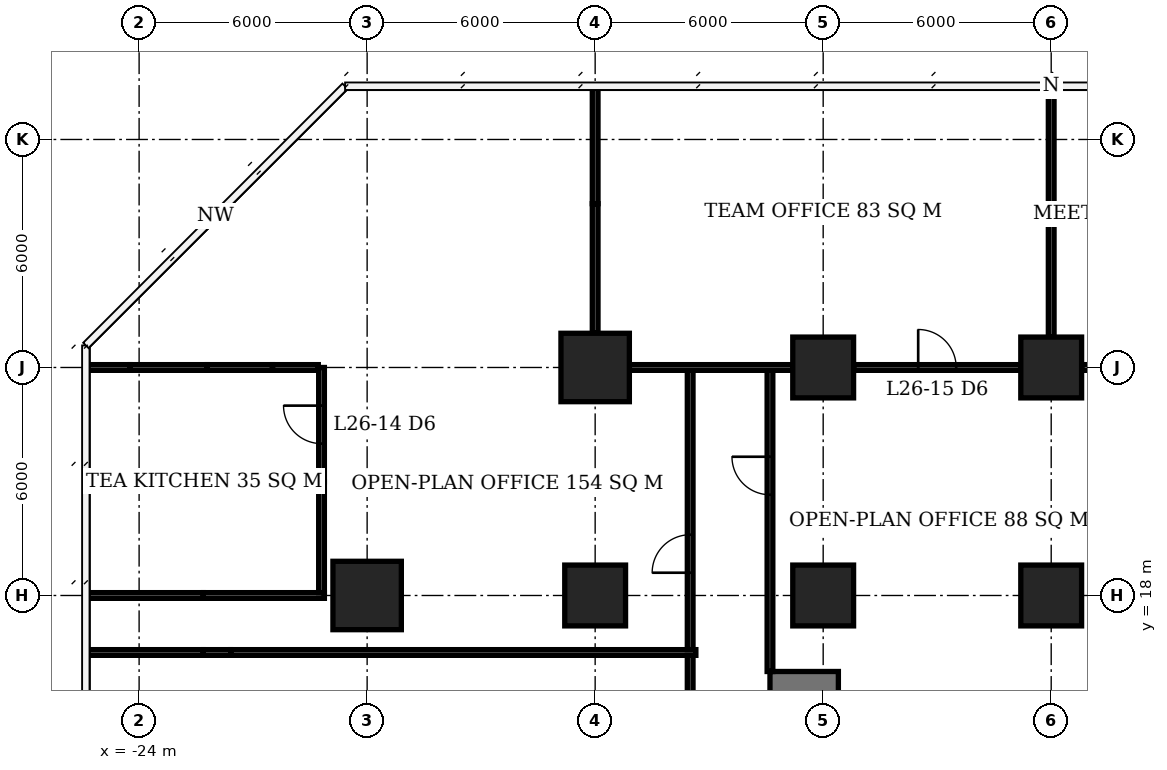
"""IFC4 building model, lengths in metres.
Left out: names, types, materials, properties, quantities, classifications, styles, units other than length and angle.
Written with IfcOpenShell. Run it as: python <this file> out.ifc"""

import sys

from ifc_helpers import new_model, si_unit, direction, frame, frame_2d, origin, origin_2d, place, context, subcontext, project, spatial, rectangle, extrude, element, fill, save


model = new_model("IFC4")
c1 = context("Model", 3, precision=1e-05, world=origin(), true_north=direction((0.0, 1.0)))
c2 = subcontext(c1, "Body", "Model", "MODEL_VIEW")
j1 = project(units=[si_unit("LENGTHUNIT", "METRE"), si_unit("PLANEANGLEUNIT", "RADIAN")], contexts=[c1])
p1 = place(None, origin())
s1 = spatial("IfcSite", under=j1, at=p1, CompositionType="ELEMENT")
p2 = place(p1, origin())
s2 = spatial("IfcBuilding", under=s1, at=p2, CompositionType="ELEMENT")
p3 = place(p2, frame((0.0, 0.0, 109.4)))
s3 = spatial("IfcBuildingStorey", under=s2, at=p3, CompositionType="ELEMENT", Elevation=109.4)
p4 = place(p3, frame((-18.0, 18.0, 0.0), z_axis=(0.0, 0.0, 1.0), x_axis=(1.0, 0.0, 0.0)))
e1 = element("IfcColumn", 1, at=p4, inside=s3, PredefinedType="COLUMN", context=c2, shape_type="SweptSolid", body=[
    extrude(rectangle(XDim=1.8, YDim=1.8, at=origin_2d()), origin(), (0.0, 0.0, 1.0), 3.9),
])
p5 = place(p3, frame((-12.0, 18.0, 0.0), z_axis=(0.0, 0.0, 1.0), x_axis=(1.0, 0.0, 0.0)))
e2 = element("IfcColumn", 2, at=p5, inside=s3, PredefinedType="COLUMN", context=c2, shape_type="SweptSolid", body=[
    extrude(rectangle(XDim=1.6, YDim=1.6, at=origin_2d()), origin(), (0.0, 0.0, 1.0), 3.9),
])
p6 = place(p3, frame((-12.0, 24.0, 0.0), z_axis=(0.0, 0.0, 1.0), x_axis=(1.0, 0.0, 0.0)))
e3 = element("IfcColumn", 3, at=p6, inside=s3, PredefinedType="COLUMN", context=c2, shape_type="SweptSolid", body=[
    extrude(rectangle(XDim=1.8, YDim=1.8, at=origin_2d()), origin(), (0.0, 0.0, 1.0), 3.9),
])
for number, where, z_axis, x_axis in (
    (4, (-6.0, 18.0, 0.0), (0.0, 0.0, 1.0), (1.0, 0.0, 0.0)),
    (5, (-6.0, 24.0, 0.0), (0.0, 0.0, 1.0), (1.0, 0.0, 0.0)),
    (6, (0.0, 18.0, 0.0), (0.0, 0.0, 1.0), (1.0, 0.0, 0.0)),
    (7, (0.0, 24.0, 0.0), (0.0, 0.0, 1.0), (1.0, 0.0, 0.0)),
):
    element("IfcColumn", number, at=place(p3, frame(where, z_axis=z_axis, x_axis=x_axis)), inside=s3, PredefinedType="COLUMN", context=c2, shape_type="SweptSolid", body=[
        extrude(rectangle(XDim=1.6, YDim=1.6, at=origin_2d()), origin(), (0.0, 0.0, 1.0), 3.9),
    ])
p7 = place(p3, frame((-6.5, 13.6, 0.0), z_axis=(0.0, 0.0, 1.0), x_axis=(0.0, 1.0, 0.0)))
e8 = element("IfcWall", 8, at=p7, inside=s3, PredefinedType="SHEAR", context=c2, shape_type="SweptSolid", body=[
    extrude(rectangle(XDim=2.4, YDim=1.8, at=frame_2d((1.2, 0.0))), origin(), (0.0, 0.0, 1.0), 3.9),
])
p8 = place(p3, frame((-25.4, 18.0, 0.0), z_axis=(0.0, 0.0, 1.0), x_axis=(1.0, 0.0, 0.0)))
e9 = element("IfcWall", 9, at=p8, inside=s3, PredefinedType="PARTITIONING", context=c2, shape_type="SweptSolid", body=[
    extrude(rectangle(XDim=3.09, YDim=0.15, at=frame_2d((1.545, 0.0))), origin(), (0.0, 0.0, 1.0), 3.65),
])
p9 = place(p3, frame((-22.31, 18.0, 0.0), z_axis=(0.0, 0.0, 1.0), x_axis=(1.0, 0.0, 0.0)))
e10 = element("IfcWall", 10, at=p9, inside=s3, PredefinedType="PARTITIONING", context=c2, shape_type="SweptSolid", body=[
    extrude(rectangle(XDim=3.185, YDim=0.15, at=frame_2d((1.593, 0.0))), origin(), (0.0, 0.0, 1.0), 2.65),
])
p10 = place(p3, frame((-25.4, 24.0, 0.0), z_axis=(0.0, 0.0, 1.0), x_axis=(1.0, 0.0, 0.0)))
e11 = element("IfcWall", 11, at=p10, inside=s3, PredefinedType="PARTITIONING", context=c2, shape_type="SweptSolid", body=[
    extrude(rectangle(XDim=1.163, YDim=0.15, at=frame_2d((0.582, 0.0))), origin(), (0.0, 0.0, 1.0), 3.65),
])
p11 = place(p3, frame((-24.237, 24.0, 0.0), z_axis=(0.0, 0.0, 1.0), x_axis=(1.0, 0.0, 0.0)))
e12 = element("IfcWall", 12, at=p11, inside=s3, PredefinedType="PARTITIONING", context=c2, shape_type="SweptSolid", body=[
    extrude(rectangle(XDim=2.029, YDim=0.15, at=frame_2d((1.015, 0.0))), origin(), (0.0, 0.0, 1.0), 2.65),
])
p12 = place(p3, frame((-22.208, 24.0, 0.0), z_axis=(0.0, 0.0, 1.0), x_axis=(1.0, 0.0, 0.0)))
e13 = element("IfcWall", 13, at=p12, inside=s3, PredefinedType="PARTITIONING", context=c2, shape_type="SweptSolid", body=[
    extrude(rectangle(XDim=1.718, YDim=0.15, at=frame_2d((0.859, 0.0))), origin(), (0.0, 0.0, 1.0), 3.65),
])
p13 = place(p3, frame((-20.49, 24.0, 0.0), z_axis=(0.0, 0.0, 1.0), x_axis=(1.0, 0.0, 0.0)))
e14 = element("IfcWall", 14, at=p13, inside=s3, PredefinedType="PARTITIONING", context=c2, shape_type="SweptSolid", body=[
    extrude(rectangle(XDim=1.205, YDim=0.15, at=frame_2d((0.603, 0.0))), origin(), (0.0, 0.0, 1.0), 2.65),
])
p14 = place(p3, frame((-11.1, 24.0, 0.0), z_axis=(0.0, 0.0, 1.0), x_axis=(1.0, 0.0, 0.0)))
e15 = element("IfcWall", 15, at=p14, inside=s3, PredefinedType="PARTITIONING", context=c2, shape_type="SweptSolid", body=[
    extrude(rectangle(XDim=4.3, YDim=0.15, at=frame_2d((2.15, 0.0))), origin(), (0.0, 0.0, 1.0), 3.65),
])
p15 = place(p3, frame((-5.2, 24.0, 0.0), z_axis=(0.0, 0.0, 1.0), x_axis=(1.0, 0.0, 0.0)))
e16 = element("IfcWall", 16, at=p15, inside=s3, PredefinedType="PARTITIONING", context=c2, shape_type="SweptSolid", body=[
    extrude(rectangle(XDim=4.4, YDim=0.15, at=frame_2d((2.2, 0.0))), origin(), (0.0, 0.0, 1.0), 3.65),
])
p16 = place(p15, frame((1.7, 0.0, 0.0)))
e17 = element("IfcOpeningElement", 17, at=p16, cuts=e16, PredefinedType="OPENING", context=c2, shape_type="SweptSolid", body=[
    extrude(rectangle(XDim=1.0, YDim=2.1, at=frame_2d((0.5, 1.05))), frame((0.0, 0.085, 0.0), z_axis=(0.0, -1.0, 0.0), x_axis=(1.0, 0.0, 0.0)), (0.0, 0.0, 1.0), 0.17),
])
p17 = place(p3, frame((0.8, 24.0, 0.0), z_axis=(0.0, 0.0, 1.0), x_axis=(1.0, 0.0, 0.0)))
e18 = element("IfcWall", 18, at=p17, inside=s3, PredefinedType="PARTITIONING", context=c2, shape_type="SweptSolid", body=[
    extrude(rectangle(XDim=4.4, YDim=0.15, at=frame_2d((2.2, 0.0))), origin(), (0.0, 0.0, 1.0), 3.65),
])
p18 = place(p17, frame((1.7, 0.0, 0.0)))
e19 = element("IfcOpeningElement", 19, at=p18, cuts=e18, PredefinedType="OPENING", context=c2, shape_type="SweptSolid", body=[
    extrude(rectangle(XDim=1.0, YDim=2.1, at=frame_2d((0.5, 1.05))), frame((0.0, 0.085, 0.0), z_axis=(0.0, -1.0, 0.0), x_axis=(1.0, 0.0, 0.0)), (0.0, 0.0, 1.0), 0.17),
])
p19 = place(p3, frame((-19.2, 18.075, 0.0), z_axis=(0.0, 0.0, 1.0), x_axis=(0.0, 1.0, 0.0)))
e20 = element("IfcWall", 20, at=p19, inside=s3, PredefinedType="PARTITIONING", context=c2, shape_type="SweptSolid", body=[
    extrude(rectangle(XDim=2.917, YDim=0.15, at=frame_2d((1.458, 0.0))), origin(), (0.0, 0.0, 1.0), 2.65),
])
p20 = place(p3, frame((-19.2, 20.992, 0.0), z_axis=(0.0, 0.0, 1.0), x_axis=(0.0, 1.0, 0.0)))
e21 = element("IfcWall", 21, at=p20, inside=s3, PredefinedType="PARTITIONING", context=c2, shape_type="SweptSolid", body=[
    extrude(rectangle(XDim=3.008, YDim=0.15, at=frame_2d((1.504, 0.0))), origin(), (0.0, 0.0, 1.0), 3.65),
])
p21 = place(p20, frame((1.004, 0.0, 0.0)))
e22 = element("IfcOpeningElement", 22, at=p21, cuts=e21, PredefinedType="OPENING", context=c2, shape_type="SweptSolid", body=[
    extrude(rectangle(XDim=1.0, YDim=2.1, at=frame_2d((0.5, 1.05))), frame((0.0, 0.085, 0.0), z_axis=(0.0, -1.0, 0.0), x_axis=(1.0, 0.0, 0.0)), (0.0, 0.0, 1.0), 0.17),
])
p22 = place(p3, frame((-12.0, 24.9, 0.0), z_axis=(0.0, 0.0, 1.0), x_axis=(0.0, 1.0, 0.0)))
e23 = element("IfcWall", 23, at=p22, inside=s3, PredefinedType="PARTITIONING", context=c2, shape_type="SweptSolid", body=[
    extrude(rectangle(XDim=3.41, YDim=0.15, at=frame_2d((1.705, 0.0))), origin(), (0.0, 0.0, 1.0), 2.65),
])
p23 = place(p3, frame((-12.0, 28.31, 0.0), z_axis=(0.0, 0.0, 1.0), x_axis=(0.0, 1.0, 0.0)))
e24 = element("IfcWall", 24, at=p23, inside=s3, PredefinedType="PARTITIONING", context=c2, shape_type="SweptSolid", body=[
    extrude(rectangle(XDim=3.09, YDim=0.15, at=frame_2d((1.545, 0.0))), origin(), (0.0, 0.0, 1.0), 3.65),
])
p24 = place(p3, frame((0.0, 24.8, 0.0), z_axis=(0.0, 0.0, 1.0), x_axis=(0.0, 1.0, 0.0)))
e25 = element("IfcWall", 25, at=p24, inside=s3, PredefinedType="PARTITIONING", context=c2, shape_type="SweptSolid", body=[
    extrude(rectangle(XDim=3.51, YDim=0.15, at=frame_2d((1.755, 0.0))), origin(), (0.0, 0.0, 1.0), 2.65),
])
p25 = place(p3, frame((0.0, 28.31, 0.0), z_axis=(0.0, 0.0, 1.0), x_axis=(0.0, 1.0, 0.0)))
e26 = element("IfcWall", 26, at=p25, inside=s3, PredefinedType="PARTITIONING", context=c2, shape_type="SweptSolid", body=[
    extrude(rectangle(XDim=3.04, YDim=0.15, at=frame_2d((1.52, 0.0))), origin(), (0.0, 0.0, 1.0), 3.65),
])
p26 = place(p3, frame((-25.4, 16.5, 0.0), z_axis=(0.0, 0.0, 1.0), x_axis=(1.0, 0.0, 0.0)))
e27 = element("IfcWall", 27, at=p26, inside=s3, PredefinedType="PARTITIONING", context=c2, shape_type="SweptSolid", body=[
    extrude(rectangle(XDim=3.09, YDim=0.15, at=frame_2d((1.545, 0.0))), origin(), (0.0, 0.0, 1.0), 3.65),
])
p27 = place(p3, frame((-22.31, 16.5, 0.0), z_axis=(0.0, 0.0, 1.0), x_axis=(1.0, 0.0, 0.0)))
e28 = element("IfcWall", 28, at=p27, inside=s3, PredefinedType="PARTITIONING", context=c2, shape_type="SweptSolid", body=[
    extrude(rectangle(XDim=0.72, YDim=0.15, at=frame_2d((0.36, 0.0))), origin(), (0.0, 0.0, 1.0), 2.65),
])
p28 = place(p3, frame((-21.59, 16.5, 0.0), z_axis=(0.0, 0.0, 1.0), x_axis=(1.0, 0.0, 0.0)))
e29 = element("IfcWall", 29, at=p28, inside=s3, PredefinedType="PARTITIONING", context=c2, shape_type="SweptSolid", body=[
    extrude(rectangle(XDim=12.24, YDim=0.15, at=frame_2d((6.12, 0.0))), origin(), (0.0, 0.0, 1.0), 3.65),
])
p29 = place(p3, frame((-9.5, 4.575, 0.0), z_axis=(0.0, 0.0, 1.0), x_axis=(0.0, 1.0, 0.0)))
e30 = element("IfcWall", 30, at=p29, inside=s3, PredefinedType="PARTITIONING", context=c2, shape_type="SweptSolid", body=[
    extrude(rectangle(XDim=11.85, YDim=0.15, at=frame_2d((5.925, 0.0))), origin(), (0.0, 0.0, 1.0), 3.65),
])
p30 = place(p29, frame((3.625, 0.0, 0.0)))
e31 = element("IfcOpeningElement", 31, at=p30, cuts=e30, PredefinedType="OPENING", context=c2, shape_type="SweptSolid", body=[
    extrude(rectangle(XDim=1.0, YDim=2.1, at=frame_2d((0.5, 1.05))), frame((0.0, 0.085, 0.0), z_axis=(0.0, -1.0, 0.0), x_axis=(1.0, 0.0, 0.0)), (0.0, 0.0, 1.0), 0.17),
])
p31 = place(p3, frame((-9.5, 16.575, 0.0), z_axis=(0.0, 0.0, 1.0), x_axis=(0.0, 1.0, 0.0)))
e32 = element("IfcWall", 32, at=p31, inside=s3, PredefinedType="PARTITIONING", context=c2, shape_type="SweptSolid", body=[
    extrude(rectangle(XDim=7.35, YDim=0.15, at=frame_2d((3.675, 0.0))), origin(), (0.0, 0.0, 1.0), 3.65),
])
p32 = place(p31, frame((2.024, 0.0, 0.0)))
e33 = element("IfcOpeningElement", 33, at=p32, cuts=e32, PredefinedType="OPENING", context=c2, shape_type="SweptSolid", body=[
    extrude(rectangle(XDim=1.0, YDim=2.1, at=frame_2d((0.5, 1.05))), frame((0.0, 0.085, 0.0), z_axis=(0.0, -1.0, 0.0), x_axis=(1.0, 0.0, 0.0)), (0.0, 0.0, 1.0), 0.17),
])
p33 = place(p3, frame((-7.4, 16.0, 0.0), z_axis=(0.0, 0.0, 1.0), x_axis=(0.0, 1.0, 0.0)))
e34 = element("IfcWall", 34, at=p33, inside=s3, PredefinedType="PARTITIONING", context=c2, shape_type="SweptSolid", body=[
    extrude(rectangle(XDim=7.925, YDim=0.15, at=frame_2d((3.962, 0.0))), origin(), (0.0, 0.0, 1.0), 3.65),
])
p34 = place(p33, frame((4.651, 0.0, 0.0)))
e35 = element("IfcOpeningElement", 35, at=p34, cuts=e34, PredefinedType="OPENING", context=c2, shape_type="SweptSolid", body=[
    extrude(rectangle(XDim=1.0, YDim=2.1, at=frame_2d((0.5, 1.05))), frame((0.0, 0.085, 0.0), z_axis=(0.0, -1.0, 0.0), x_axis=(1.0, 0.0, 0.0)), (0.0, 0.0, 1.0), 0.17),
])
p35 = place(p21, origin())
e36 = element("IfcDoor", 36, at=p35, inside=s3, OperationType="SINGLE_SWING_RIGHT", PredefinedType="DOOR", context=c2, shape_type="SweptSolid", body=[
    extrude(rectangle(XDim=1.0, YDim=2.1, at=frame_2d((0.5, 1.05))), frame((0.0, 0.025, 0.0), z_axis=(0.0, -1.0, 0.0), x_axis=(1.0, 0.0, 0.0)), (0.0, 0.0, 1.0), 0.05),
])
fill(e22, e36)
p36 = place(p16, origin())
e37 = element("IfcDoor", 37, at=p36, inside=s3, OperationType="SINGLE_SWING_LEFT", PredefinedType="DOOR", context=c2, shape_type="SweptSolid", body=[
    extrude(rectangle(XDim=1.0, YDim=2.1, at=frame_2d((0.5, 1.05))), frame((0.0, 0.025, 0.0), z_axis=(0.0, -1.0, 0.0), x_axis=(1.0, 0.0, 0.0)), (0.0, 0.0, 1.0), 0.05),
])
fill(e17, e37)
p37 = place(p34, origin())
e38 = element("IfcDoor", 38, at=p37, inside=s3, OperationType="SINGLE_SWING_RIGHT", PredefinedType="DOOR", context=c2, shape_type="SweptSolid", body=[
    extrude(rectangle(XDim=1.0, YDim=2.1, at=frame_2d((0.5, 1.05))), frame((0.0, 0.025, 0.0), z_axis=(0.0, -1.0, 0.0), x_axis=(1.0, 0.0, 0.0)), (0.0, 0.0, 1.0), 0.05),
])
fill(e35, e38)
p38 = place(p32, origin())
e39 = element("IfcDoor", 39, at=p38, inside=s3, OperationType="SINGLE_SWING_LEFT", PredefinedType="DOOR", context=c2, shape_type="SweptSolid", body=[
    extrude(rectangle(XDim=1.0, YDim=2.1, at=frame_2d((0.5, 1.05))), frame((0.0, 0.025, 0.0), z_axis=(0.0, -1.0, 0.0), x_axis=(1.0, 0.0, 0.0)), (0.0, 0.0, 1.0), 0.05),
])
fill(e33, e39)
save(model, sys.argv[1])
